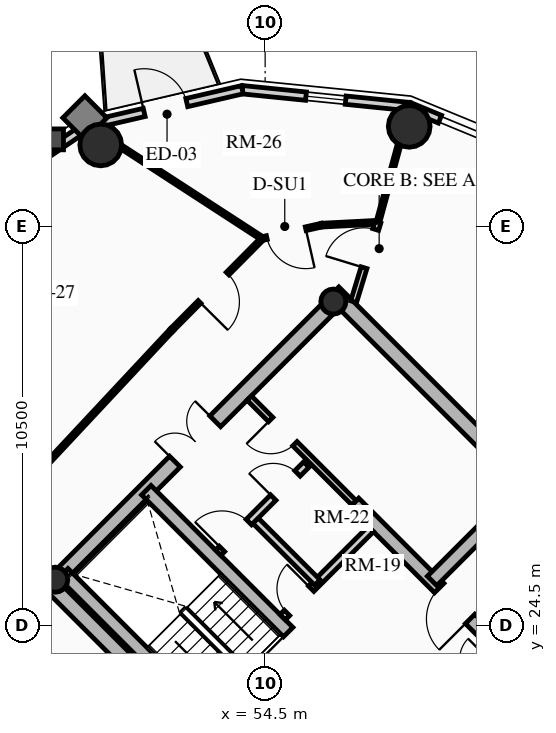
"""IFC4 building model, lengths in metres.
Left out: names, types, materials, properties, quantities, classifications, styles, units other than length and angle.
Written with IfcOpenShell. Run it as: python <this file> out.ifc"""

import sys

from ifc_helpers import new_model, si_unit, direction, frame, frame_2d, origin, origin_2d, place, context, subcontext, project, spatial, rectangle, circle, hollow_circle, extrude, source, transform, mapped, element, fill, save


model = new_model("IFC4")
c1 = context("Model", 3, precision=1e-05, world=origin(), true_north=direction((0.0, 1.0)))
c2 = subcontext(c1, "Body", "Model", "MODEL_VIEW")
j1 = project(units=[si_unit("LENGTHUNIT", "METRE"), si_unit("PLANEANGLEUNIT", "RADIAN")], contexts=[c1])
p1 = place(None, origin())
s1 = spatial("IfcSite", under=j1, at=p1, CompositionType="ELEMENT")
p2 = place(p1, origin())
s2 = spatial("IfcBuilding", under=s1, at=p2, CompositionType="ELEMENT")
p3 = place(p2, frame((0.0, 0.0, 232.45)))
s3 = spatial("IfcBuildingStorey", under=s2, at=p3, CompositionType="ELEMENT", Elevation=232.45)
for number, where, z_axis, x_axis in (
    (1, (58.702, 15.732, 0.0), (0.0, 0.0, 1.0), (-0.707, 0.707, 0.0)),
    (2, (66.268, 23.298, 0.0), (0.0, 0.0, 1.0), (-0.707, 0.707, 0.0)),
):
    element("IfcWall", number, at=place(p3, frame(where, z_axis=z_axis, x_axis=x_axis)), inside=s3, PredefinedType="SHEAR", context=c2, shape_type="SweptSolid", body=[
        extrude(rectangle(XDim=14.1, YDim=0.4, at=frame_2d((7.05, 0.0))), origin(), (0.0, 0.0, 1.0), 3.2),
    ])
p4 = place(p3, frame((48.873, 25.561, 0.0), z_axis=(0.0, 0.0, 1.0), x_axis=(0.707106781187, 0.707106781187, 0.0)))
e3 = element("IfcWall", 3, at=p4, inside=s3, PredefinedType="SHEAR", context=c2, shape_type="SweptSolid", body=[
    extrude(rectangle(XDim=10.7, YDim=0.4, at=frame_2d((5.35, 0.0))), origin(), (0.0, 0.0, 1.0), 3.2),
])
m1 = source(origin(), c2, "Body", "SweptSolid", [
    extrude(rectangle(XDim=1.5, YDim=2.02, at=frame_2d((0.75, 1.01))), frame((0.0, 0.21, 0.0), z_axis=(0.0, -1.0, 0.0), x_axis=(1.0, 0.0, 0.0)), (0.0, 0.0, 1.0), 0.42),
])
p5 = place(p4, frame((4.6, 0.0, 0.0)))
e4 = element("IfcOpeningElement", 4, at=p5, cuts=e3, PredefinedType="OPENING", context=c2, shape_type="MappedRepresentation", body=[
    mapped(m1, transform((0.0, 0.0, 0.0), x_axis=(1.0, 0.0, 0.0), y_axis=(0.0, 1.0, 0.0), z_axis=(0.0, 0.0, 1.0), scale=1.0)),
])
p6 = place(p3, frame((61.06, 18.373, 0.0), z_axis=(0.0, 0.0, 1.0), x_axis=(-0.707106781187, 0.707106781187, 0.0)))
e5 = element("IfcWall", 5, at=p6, inside=s3, PredefinedType="SHEAR", context=c2, shape_type="SweptSolid", body=[
    extrude(rectangle(XDim=13.7, YDim=0.35, at=frame_2d((6.85, 0.0))), origin(), (0.0, 0.0, 1.0), 3.2),
])
m2 = source(origin(), c2, "Body", "SweptSolid", [
    extrude(rectangle(XDim=1.1, YDim=2.015, at=frame_2d((0.55, 1.007))), frame((0.0, 0.185, 0.0), z_axis=(0.0, -1.0, 0.0), x_axis=(1.0, 0.0, 0.0)), (0.0, 0.0, 1.0), 0.37),
])
p7 = place(p6, frame((4.85, 0.0, 0.0)))
e6 = element("IfcOpeningElement", 6, at=p7, cuts=e5, PredefinedType="OPENING", context=c2, shape_type="MappedRepresentation", body=[
    mapped(m2, transform((0.0, 0.0, 0.0), x_axis=(1.0, 0.0, 0.0), y_axis=(0.0, 1.0, 0.0), z_axis=(0.0, 0.0, 1.0), scale=1.0)),
])
p8 = place(p6, frame((0.625, 0.0, 0.0)))
e7 = element("IfcOpeningElement", 7, at=p8, cuts=e5, PredefinedType="OPENING", context=c2, shape_type="MappedRepresentation", body=[
    mapped(m2, transform((0.0, 0.0, 0.0), x_axis=(1.0, 0.0, 0.0), y_axis=(0.0, 1.0, 0.0), z_axis=(0.0, 0.0, 1.0), scale=1.0)),
])
p9 = place(p6, frame((2.625, 0.0, 0.0)))
e8 = element("IfcOpeningElement", 8, at=p9, cuts=e5, PredefinedType="OPENING", context=c2, shape_type="MappedRepresentation", body=[
    mapped(m2, transform((0.0, 0.0, 0.0), x_axis=(1.0, 0.0, 0.0), y_axis=(0.0, 1.0, 0.0), z_axis=(0.0, 0.0, 1.0), scale=1.0)),
])
m3 = source(origin(), c2, "Body", "SweptSolid", [
    extrude(rectangle(XDim=1.15, YDim=2.02, at=frame_2d((0.575, 1.01))), frame((0.0, 0.185, 0.0), z_axis=(0.0, -1.0, 0.0), x_axis=(1.0, 0.0, 0.0)), (0.0, 0.0, 1.0), 0.37),
])
p10 = place(p6, frame((7.27, 0.0, 0.0)))
e9 = element("IfcOpeningElement", 9, at=p10, cuts=e5, PredefinedType="OPENING", context=c2, shape_type="MappedRepresentation", body=[
    mapped(m3, transform((0.0, 0.0, 0.0), x_axis=(1.0, 0.0, 0.0), y_axis=(0.0, 1.0, 0.0), z_axis=(0.0, 0.0, 1.0), scale=1.0)),
])
p11 = place(p3, frame((63.627, 20.94, 0.0), z_axis=(0.0, 0.0, 1.0), x_axis=(-0.707119496762, 0.707094065383, 0.0)))
e10 = element("IfcWall", 10, at=p11, inside=s3, PredefinedType="SHEAR", context=c2, shape_type="SweptSolid", body=[
    extrude(rectangle(XDim=9.6, YDim=0.35, at=frame_2d((4.8, 0.0))), origin(), (0.0, 0.0, 1.0), 3.2),
])
p12 = place(p11, frame((5.28, 0.0, 0.0)))
e11 = element("IfcOpeningElement", 11, at=p12, cuts=e10, PredefinedType="OPENING", context=c2, shape_type="MappedRepresentation", body=[
    mapped(m3, transform((0.0, 0.0, 0.0), x_axis=(1.0, 0.0, 0.0), y_axis=(0.0, 1.0, 0.0), z_axis=(0.0, 0.0, 1.0), scale=1.0)),
])
p13 = place(p3, frame((53.922, 21.141, 0.0), z_axis=(0.0, 0.0, 1.0), x_axis=(-0.707106781187, 0.707106781187, 0.0)))
e12 = element("IfcWall", 12, at=p13, inside=s3, PredefinedType="SHEAR", context=c2, shape_type="SweptSolid", body=[
    extrude(rectangle(XDim=6.695, YDim=0.35, at=frame_2d((3.348, 0.0))), origin(), (0.0, 0.0, 1.0), 3.2),
])
p14 = place(p3, frame((58.893, 25.674, 0.0), z_axis=(0.0, 0.0, 1.0), x_axis=(0.707106781187, 0.707106781187, 0.0)))
e13 = element("IfcWall", 13, at=p14, inside=s3, PredefinedType="SHEAR", context=c2, shape_type="SweptSolid", body=[
    extrude(rectangle(XDim=3.285, YDim=0.35, at=frame_2d((1.643, 0.0))), origin(), (0.0, 0.0, 1.0), 3.2),
])
for number, where, z_axis, x_axis in (
    (14, (48.976, 25.706, 0.0), (0.0, 0.0, 1.0), (0.707, 0.707, 0.0)),
    (15, (56.294, 33.024, 0.0), (0.0, 0.0, 1.0), (0.707, 0.707, 0.0)),
):
    element("IfcColumn", number, at=place(p3, frame(where, z_axis=z_axis, x_axis=x_axis)), inside=s3, PredefinedType="COLUMN", context=c2, shape_type="SweptSolid", body=[
        extrude(hollow_circle(Radius=0.33, WallThickness=0.025, at=origin_2d()), origin(), (0.0, 0.0, 1.0), 3.2),
    ])
for number, where, z_axis, x_axis in (
    (16, (58.291, 37.635, 0.0), (0.0, 0.0, 1.0), (1.0, 0.0, 0.0)),
    (17, (50.173, 37.146, 0.0), (0.0, 0.0, 1.0), (1.0, 0.0, 0.0)),
):
    element("IfcColumn", number, at=place(p3, frame(where, z_axis=z_axis, x_axis=x_axis)), inside=s3, PredefinedType="USERDEFINED", context=c2, shape_type="SweptSolid", body=[
        extrude(circle(Radius=0.55, at=origin_2d()), origin(), (0.0, 0.0, 1.0), 3.2),
    ])
p15 = place(p3, frame((58.295, 38.155, 0.0), z_axis=(0.0, 0.0, 1.0), x_axis=(0.924515260676, -0.381145028536, 0.0)))
e18 = element("IfcWall", 18, at=p15, inside=s3, PredefinedType="SOLIDWALL", context=c2, shape_type="SweptSolid", body=[
    extrude(rectangle(XDim=0.87, YDim=0.22, at=frame_2d((0.435, 0.0))), origin(), (0.0, 0.0, 1.0), 2.402),
])
p16 = place(p3, frame((53.9, 38.599, 0.0), z_axis=(0.0, 0.0, 1.0), x_axis=(0.994929930991, -0.100570534541, 0.0)))
e19 = element("IfcWall", 19, at=p16, inside=s3, PredefinedType="SOLIDWALL", context=c2, shape_type="SweptSolid", body=[
    extrude(rectangle(XDim=4.418, YDim=0.22, at=frame_2d((2.209, 0.0))), origin(), (0.0, 0.0, 1.0), 2.402),
])
m4 = source(origin(), c2, "Body", "SweptSolid", [
    extrude(rectangle(XDim=1.05, YDim=1.3, at=frame_2d((0.525, 0.65))), frame((0.0, 0.12, 0.0), z_axis=(0.0, -1.0, 0.0), x_axis=(1.0, 0.0, 0.0)), (0.0, 0.0, 1.0), 0.24),
])
p17 = place(p16, frame((1.684, 0.0, 0.65)))
e20 = element("IfcOpeningElement", 20, at=p17, cuts=e19, PredefinedType="OPENING", context=c2, shape_type="MappedRepresentation", body=[
    mapped(m4, transform((0.0, 0.0, 0.0), x_axis=(1.0, 0.0, 0.0), y_axis=(0.0, 1.0, 0.0), z_axis=(0.0, 0.0, 1.0), scale=1.0)),
])
p18 = place(p3, frame((49.856, 37.663, 0.0), z_axis=(0.0, 0.0, 1.0), x_axis=(0.974249228678, 0.225473813158, 0.0)))
e21 = element("IfcWall", 21, at=p18, inside=s3, PredefinedType="SOLIDWALL", context=c2, shape_type="SweptSolid", body=[
    extrude(rectangle(XDim=4.15, YDim=0.22, at=frame_2d((2.075, 0.0))), origin(), (0.0, 0.0, 1.0), 2.402),
])
m5 = source(origin(), c2, "Body", "SweptSolid", [
    extrude(rectangle(XDim=1.15, YDim=2.005, at=frame_2d((0.575, 1.002))), frame((0.0, 0.12, 0.0), z_axis=(0.0, -1.0, 0.0), x_axis=(1.0, 0.0, 0.0)), (0.0, 0.0, 1.0), 0.24),
])
p19 = place(p18, frame((1.5, 0.0, 0.0)))
e22 = element("IfcOpeningElement", 22, at=p19, cuts=e21, PredefinedType="OPENING", context=c2, shape_type="MappedRepresentation", body=[
    mapped(m5, transform((0.0, 0.0, 0.0), x_axis=(1.0, 0.0, 0.0), y_axis=(0.0, 1.0, 0.0), z_axis=(0.0, 0.0, 1.0), scale=1.0)),
])
p20 = place(p3, frame((46.561, 35.439, 0.0), z_axis=(0.0, 0.0, 1.0), x_axis=(0.828833723692, 0.559495003079, 0.0)))
e23 = element("IfcWall", 23, at=p20, inside=s3, PredefinedType="SOLIDWALL", context=c2, shape_type="SweptSolid", body=[
    extrude(rectangle(XDim=3.976, YDim=0.22, at=frame_2d((1.988, 0.0))), origin(), (0.0, 0.0, 1.0), 2.402),
])
p21 = place(p3, frame((58.214, 21.467, 0.0), z_axis=(0.0, 0.0, 1.0), x_axis=(0.707106781187, 0.707106781187, 0.0)))
e24 = element("IfcWall", 24, at=p21, inside=s3, PredefinedType="PARTITIONING", context=c2, shape_type="SweptSolid", body=[
    extrude(rectangle(XDim=3.28, YDim=0.2, at=frame_2d((1.64, 0.0))), origin(), (0.0, 0.0, 1.0), 2.765),
])
m6 = source(origin(), c2, "Body", "SweptSolid", [
    extrude(rectangle(XDim=1.5, YDim=2.02, at=frame_2d((0.75, 1.01))), frame((0.0, 0.11, 0.0), z_axis=(0.0, -1.0, 0.0), x_axis=(1.0, 0.0, 0.0)), (0.0, 0.0, 1.0), 0.22),
])
p22 = place(p21, frame((1.55, 0.0, 0.0)))
e25 = element("IfcOpeningElement", 25, at=p22, cuts=e24, PredefinedType="OPENING", context=c2, shape_type="MappedRepresentation", body=[
    mapped(m6, transform((0.0, 0.0, 0.0), x_axis=(1.0, 0.0, 0.0), y_axis=(0.0, 1.0, 0.0), z_axis=(0.0, 0.0, 1.0), scale=1.0)),
])
p23 = place(p3, frame((54.961, 24.719, 0.0), z_axis=(0.0, 0.0, 1.0), x_axis=(0.707106781187, 0.707106781187, 0.0)))
e26 = element("IfcWall", 26, at=p23, inside=s3, PredefinedType="PARTITIONING", context=c2, shape_type="SweptSolid", body=[
    extrude(rectangle(XDim=3.28, YDim=0.2, at=frame_2d((1.64, 0.0))), origin(), (0.0, 0.0, 1.0), 2.765),
])
m7 = source(origin(), c2, "Body", "SweptSolid", [
    extrude(rectangle(XDim=0.9, YDim=2.005, at=frame_2d((0.45, 1.002))), frame((0.0, 0.11, 0.0), z_axis=(0.0, -1.0, 0.0), x_axis=(1.0, 0.0, 0.0)), (0.0, 0.0, 1.0), 0.22),
])
p24 = place(p23, frame((0.16, 0.0, 0.0)))
e27 = element("IfcOpeningElement", 27, at=p24, cuts=e26, PredefinedType="OPENING", context=c2, shape_type="MappedRepresentation", body=[
    mapped(m7, transform((0.0, 0.0, 0.0), x_axis=(1.0, 0.0, 0.0), y_axis=(0.0, 1.0, 0.0), z_axis=(0.0, 0.0, 1.0), scale=1.0)),
])
p25 = place(p3, frame((55.874, 25.631, 0.0), z_axis=(0.0, 0.0, 1.0), x_axis=(-0.707157639372, 0.707055919343, 0.0)))
e28 = element("IfcWall", 28, at=p25, inside=s3, PredefinedType="PARTITIONING", context=c2, shape_type="SweptSolid", body=[
    extrude(rectangle(XDim=2.4, YDim=0.2, at=frame_2d((1.2, 0.0))), origin(), (0.0, 0.0, 1.0), 2.765),
])
p26 = place(p3, frame((53.264, 26.416, 0.0), z_axis=(0.0, 0.0, 1.0), x_axis=(0.707106781187, 0.707106781187, 0.0)))
e29 = element("IfcWall", 29, at=p26, inside=s3, PredefinedType="PARTITIONING", context=c2, shape_type="SweptSolid", body=[
    extrude(rectangle(XDim=3.28, YDim=0.2, at=frame_2d((1.64, 0.0))), origin(), (0.0, 0.0, 1.0), 2.765),
])
m8 = source(origin(), c2, "Body", "SweptSolid", [
    extrude(rectangle(XDim=1.0, YDim=2.015, at=frame_2d((0.5, 1.007))), frame((0.0, 0.11, 0.0), z_axis=(0.0, -1.0, 0.0), x_axis=(1.0, 0.0, 0.0)), (0.0, 0.0, 1.0), 0.22),
])
p27 = place(p26, frame((0.14, 0.0, 0.0)))
e30 = element("IfcOpeningElement", 30, at=p27, cuts=e29, PredefinedType="OPENING", context=c2, shape_type="MappedRepresentation", body=[
    mapped(m8, transform((0.0, 0.0, 0.0), x_axis=(1.0, 0.0, 0.0), y_axis=(0.0, 1.0, 0.0), z_axis=(0.0, 0.0, 1.0), scale=1.0)),
])
p28 = place(p26, frame((2.05, 0.0, 0.0)))
e31 = element("IfcOpeningElement", 31, at=p28, cuts=e29, PredefinedType="OPENING", context=c2, shape_type="MappedRepresentation", body=[
    mapped(m7, transform((0.0, 0.0, 0.0), x_axis=(1.0, 0.0, 0.0), y_axis=(0.0, 1.0, 0.0), z_axis=(0.0, 0.0, 1.0), scale=1.0)),
])
p29 = place(p3, frame((56.839, 27.728, 0.0), z_axis=(0.0, 0.0, 1.0), x_axis=(-0.707106781187, 0.707106781187, 0.0)))
e32 = element("IfcWall", 32, at=p29, inside=s3, PredefinedType="PARTITIONING", context=c2, shape_type="SweptSolid", body=[
    extrude(rectangle(XDim=3.9, YDim=0.16, at=frame_2d((1.95, 0.0))), origin(), (0.0, 0.0, 1.0), 2.765),
])
m9 = source(origin(), c2, "Body", "SweptSolid", [
    extrude(rectangle(XDim=0.9, YDim=2.005, at=frame_2d((0.45, 1.002))), frame((0.0, 0.09, 0.0), z_axis=(0.0, -1.0, 0.0), x_axis=(1.0, 0.0, 0.0)), (0.0, 0.0, 1.0), 0.18),
])
p30 = place(p29, frame((2.2, 0.0, 0.0)))
e33 = element("IfcOpeningElement", 33, at=p30, cuts=e32, PredefinedType="OPENING", context=c2, shape_type="MappedRepresentation", body=[
    mapped(m9, transform((0.0, 0.0, 0.0), x_axis=(1.0, 0.0, 0.0), y_axis=(0.0, 1.0, 0.0), z_axis=(0.0, 0.0, 1.0), scale=1.0)),
])
p31 = place(p3, frame((57.467, 35.111, 0.0), z_axis=(0.0, 0.0, 1.0), x_axis=(-0.998691757323, -0.051134859488, 0.0)))
e34 = element("IfcWall", 34, at=p31, inside=s3, PredefinedType="MOVABLE", context=c2, shape_type="SweptSolid", body=[
    extrude(rectangle(XDim=1.485, YDim=0.1, at=frame_2d((0.742, 0.0))), origin(), (0.0, 0.0, 1.0), 2.402),
])
p32 = place(p3, frame((55.984, 35.035, 0.0), z_axis=(0.0, 0.0, 1.0), x_axis=(-0.975290305708, -0.22092718165, 0.0)))
e35 = element("IfcWall", 35, at=p32, inside=s3, PredefinedType="MOVABLE", context=c2, shape_type="SweptSolid", body=[
    extrude(rectangle(XDim=1.597, YDim=0.1, at=frame_2d((0.798, 0.0))), origin(), (0.0, 0.0, 1.0), 2.335),
])
m10 = source(origin(), c2, "Body", "SweptSolid", [
    extrude(rectangle(XDim=1.05, YDim=2.015, at=frame_2d((0.525, 1.007))), frame((0.0, 0.06, 0.0), z_axis=(0.0, -1.0, 0.0), x_axis=(1.0, 0.0, 0.0)), (0.0, 0.0, 1.0), 0.12),
])
p33 = place(p32, frame((0.427, 0.0, 0.0)))
e36 = element("IfcOpeningElement", 36, at=p33, cuts=e35, PredefinedType="OPENING", context=c2, shape_type="MappedRepresentation", body=[
    mapped(m10, transform((0.0, 0.0, 0.0), x_axis=(1.0, 0.0, 0.0), y_axis=(0.0, 1.0, 0.0), z_axis=(0.0, 0.0, 1.0), scale=1.0)),
])
p34 = place(p3, frame((54.427, 34.683, 0.0), z_axis=(0.0, 0.0, 1.0), x_axis=(-0.704178989986, -0.710022499687, 0.0)))
e37 = element("IfcWall", 37, at=p34, inside=s3, PredefinedType="MOVABLE", context=c2, shape_type="SweptSolid", body=[
    extrude(rectangle(XDim=3.384, YDim=0.1, at=frame_2d((1.692, 0.0))), origin(), (0.0, 0.0, 1.0), 2.402),
])
p35 = place(p34, frame((1.298, 0.0, 0.0)))
e38 = element("IfcOpeningElement", 38, at=p35, cuts=e37, PredefinedType="OPENING", context=c2, shape_type="MappedRepresentation", body=[
    mapped(m10, transform((0.0, 0.0, 0.0), x_axis=(1.0, 0.0, 0.0), y_axis=(0.0, 1.0, 0.0), z_axis=(0.0, 0.0, 1.0), scale=1.0)),
])
p36 = place(p3, frame((52.043, 32.28, 0.0), z_axis=(0.0, 0.0, 1.0), x_axis=(-0.682606081633, -0.730786519661, 0.0)))
e39 = element("IfcWall", 39, at=p36, inside=s3, PredefinedType="MOVABLE", context=c2, shape_type="SweptSolid", body=[
    extrude(rectangle(XDim=6.527, YDim=0.1, at=frame_2d((3.263, 0.0))), origin(), (0.0, 0.0, 1.0), 2.335),
])
p37 = place(p3, frame((57.467, 35.111, 0.0), z_axis=(0.0, 0.0, 1.0), x_axis=(0.263354670488, 0.964699081337, 0.0)))
e40 = element("IfcWall", 40, at=p37, inside=s3, PredefinedType="MOVABLE", context=c2, shape_type="SweptSolid", body=[
    extrude(rectangle(XDim=3.134, YDim=0.1, at=frame_2d((1.567, 0.0))), origin(), (0.0, 0.0, 1.0), 2.402),
])
p38 = place(p3, frame((54.427, 34.683, 0.0), z_axis=(0.0, 0.0, 1.0), x_axis=(-0.83860663594, 0.544737469023, 0.0)))
e41 = element("IfcWall", 41, at=p38, inside=s3, PredefinedType="MOVABLE", context=c2, shape_type="SweptSolid", body=[
    extrude(rectangle(XDim=5.439, YDim=0.1, at=frame_2d((2.72, 0.0))), origin(), (0.0, 0.0, 1.0), 2.402),
])
p39 = place(p3, frame((56.828, 33.021, 0.0), z_axis=(0.0, 0.0, 1.0), x_axis=(0.292139093972, 0.956375841274, 0.0)))
e42 = element("IfcWall", 42, at=p39, inside=s3, PredefinedType="PARTITIONING", context=c2, shape_type="SweptSolid", body=[
    extrude(rectangle(XDim=2.186, YDim=0.16, at=frame_2d((1.093, 0.0))), origin(), (0.0, 0.0, 1.0), 2.335),
])
m11 = source(origin(), c2, "Body", "SweptSolid", [
    extrude(rectangle(XDim=1.05, YDim=2.015, at=frame_2d((0.525, 1.007))), frame((0.0, 0.09, 0.0), z_axis=(0.0, -1.0, 0.0), x_axis=(1.0, 0.0, 0.0)), (0.0, 0.0, 1.0), 0.18),
])
p40 = place(p39, frame((0.936, 0.0, 0.0)))
e43 = element("IfcOpeningElement", 43, at=p40, cuts=e42, PredefinedType="OPENING", context=c2, shape_type="MappedRepresentation", body=[
    mapped(m11, transform((0.0, 0.0, 0.0), x_axis=(1.0, 0.0, 0.0), y_axis=(0.0, 1.0, 0.0), z_axis=(0.0, 0.0, 1.0), scale=1.0)),
])
m12 = source(origin(), c2, "Body", "SweptSolid", [
    extrude(rectangle(XDim=1.05, YDim=1.3, at=frame_2d((0.525, 0.65))), frame((0.0, 0.03, 0.0), z_axis=(0.0, -1.0, 0.0), x_axis=(1.0, 0.0, 0.0)), (0.0, 0.0, 1.0), 0.06),
])
p41 = place(p17, origin())
e44 = element("IfcWindow", 44, at=p41, inside=s3, PartitioningType="SINGLE_PANEL", PredefinedType="WINDOW", context=c2, shape_type="MappedRepresentation", body=[
    mapped(m12, transform((0.0, 0.0, 0.0), x_axis=(1.0, 0.0, 0.0), y_axis=(0.0, 1.0, 0.0), z_axis=(0.0, 0.0, 1.0), scale=1.0)),
])
fill(e20, e44)
m13 = source(origin(), c2, "Body", "SweptSolid", [
    extrude(rectangle(XDim=1.15, YDim=2.005, at=frame_2d((0.575, 1.002))), frame((0.0, 0.025, 0.0), z_axis=(0.0, -1.0, 0.0), x_axis=(1.0, 0.0, 0.0)), (0.0, 0.0, 1.0), 0.05),
])
p42 = place(p19, origin())
e45 = element("IfcDoor", 45, at=p42, inside=s3, OperationType="SINGLE_SWING_LEFT", PredefinedType="DOOR", context=c2, shape_type="MappedRepresentation", body=[
    mapped(m13, transform((0.0, 0.0, 0.0), x_axis=(1.0, 0.0, 0.0), y_axis=(0.0, 1.0, 0.0), z_axis=(0.0, 0.0, 1.0), scale=1.0)),
])
fill(e22, e45)
m14 = source(origin(), c2, "Body", "SweptSolid", [
    extrude(rectangle(XDim=1.15, YDim=2.02, at=frame_2d((0.575, 1.01))), frame((0.0, 0.025, 0.0), z_axis=(0.0, -1.0, 0.0), x_axis=(1.0, 0.0, 0.0)), (0.0, 0.0, 1.0), 0.05),
])
p43 = place(p10, origin())
e46 = element("IfcDoor", 46, at=p43, inside=s3, OperationType="SINGLE_SWING_RIGHT", PredefinedType="DOOR", context=c2, shape_type="MappedRepresentation", body=[
    mapped(m14, transform((0.0, 0.0, 0.0), x_axis=(1.0, 0.0, 0.0), y_axis=(0.0, 1.0, 0.0), z_axis=(0.0, 0.0, 1.0), scale=1.0)),
])
fill(e9, e46)
p44 = place(p12, origin())
e47 = element("IfcDoor", 47, at=p44, inside=s3, OperationType="SINGLE_SWING_LEFT", PredefinedType="DOOR", context=c2, shape_type="MappedRepresentation", body=[
    mapped(m14, transform((0.0, 0.0, 0.0), x_axis=(1.0, 0.0, 0.0), y_axis=(0.0, 1.0, 0.0), z_axis=(0.0, 0.0, 1.0), scale=1.0)),
])
fill(e11, e47)
m15 = source(origin(), c2, "Body", "SweptSolid", [
    extrude(rectangle(XDim=1.5, YDim=2.02, at=frame_2d((0.75, 1.01))), frame((0.0, 0.025, 0.0), z_axis=(0.0, -1.0, 0.0), x_axis=(1.0, 0.0, 0.0)), (0.0, 0.0, 1.0), 0.05),
])
p45 = place(p5, origin())
e48 = element("IfcDoor", 48, at=p45, inside=s3, OperationType="DOUBLE_DOOR_SINGLE_SWING", PredefinedType="DOOR", context=c2, shape_type="MappedRepresentation", body=[
    mapped(m15, transform((0.0, 0.0, 0.0), x_axis=(1.0, 0.0, 0.0), y_axis=(0.0, 1.0, 0.0), z_axis=(0.0, 0.0, 1.0), scale=1.0)),
])
fill(e4, e48)
m16 = source(origin(), c2, "Body", "SweptSolid", [
    extrude(rectangle(XDim=0.9, YDim=2.005, at=frame_2d((0.45, 1.002))), frame((0.0, 0.025, 0.0), z_axis=(0.0, -1.0, 0.0), x_axis=(1.0, 0.0, 0.0)), (0.0, 0.0, 1.0), 0.05),
])
p46 = place(p24, origin())
e49 = element("IfcDoor", 49, at=p46, inside=s3, OperationType="SINGLE_SWING_RIGHT", PredefinedType="DOOR", context=c2, shape_type="MappedRepresentation", body=[
    mapped(m16, transform((0.0, 0.0, 0.0), x_axis=(1.0, 0.0, 0.0), y_axis=(0.0, 1.0, 0.0), z_axis=(0.0, 0.0, 1.0), scale=1.0)),
])
fill(e27, e49)
m17 = source(origin(), c2, "Body", "SweptSolid", [
    extrude(rectangle(XDim=1.0, YDim=2.015, at=frame_2d((0.5, 1.007))), frame((0.0, 0.025, 0.0), z_axis=(0.0, -1.0, 0.0), x_axis=(1.0, 0.0, 0.0)), (0.0, 0.0, 1.0), 0.05),
])
p47 = place(p27, origin())
e50 = element("IfcDoor", 50, at=p47, inside=s3, OperationType="SINGLE_SWING_LEFT", PredefinedType="DOOR", context=c2, shape_type="MappedRepresentation", body=[
    mapped(m17, transform((0.0, 0.0, 0.0), x_axis=(1.0, 0.0, 0.0), y_axis=(0.0, 1.0, 0.0), z_axis=(0.0, 0.0, 1.0), scale=1.0)),
])
fill(e30, e50)
p48 = place(p28, origin())
e51 = element("IfcDoor", 51, at=p48, inside=s3, OperationType="SINGLE_SWING_LEFT", PredefinedType="DOOR", context=c2, shape_type="MappedRepresentation", body=[
    mapped(m16, transform((0.0, 0.0, 0.0), x_axis=(1.0, 0.0, 0.0), y_axis=(0.0, 1.0, 0.0), z_axis=(0.0, 0.0, 1.0), scale=1.0)),
])
fill(e31, e51)
p49 = place(p30, origin())
e52 = element("IfcDoor", 52, at=p49, inside=s3, OperationType="SINGLE_SWING_RIGHT", PredefinedType="DOOR", context=c2, shape_type="MappedRepresentation", body=[
    mapped(m16, transform((0.0, 0.0, 0.0), x_axis=(1.0, 0.0, 0.0), y_axis=(0.0, 1.0, 0.0), z_axis=(0.0, 0.0, 1.0), scale=1.0)),
])
fill(e33, e52)
m18 = source(origin(), c2, "Body", "SweptSolid", [
    extrude(rectangle(XDim=1.05, YDim=2.015, at=frame_2d((0.525, 1.007))), frame((0.0, 0.025, 0.0), z_axis=(0.0, -1.0, 0.0), x_axis=(1.0, 0.0, 0.0)), (0.0, 0.0, 1.0), 0.05),
])
p50 = place(p40, origin())
e53 = element("IfcDoor", 53, at=p50, inside=s3, OperationType="SINGLE_SWING_LEFT", PredefinedType="DOOR", context=c2, shape_type="MappedRepresentation", body=[
    mapped(m18, transform((0.0, 0.0, 0.0), x_axis=(1.0, 0.0, 0.0), y_axis=(0.0, 1.0, 0.0), z_axis=(0.0, 0.0, 1.0), scale=1.0)),
])
fill(e43, e53)
p51 = place(p33, origin())
e54 = element("IfcDoor", 54, at=p51, inside=s3, OperationType="SINGLE_SWING_LEFT", PredefinedType="DOOR", context=c2, shape_type="MappedRepresentation", body=[
    mapped(m18, transform((0.0, 0.0, 0.0), x_axis=(1.0, 0.0, 0.0), y_axis=(0.0, 1.0, 0.0), z_axis=(0.0, 0.0, 1.0), scale=1.0)),
])
fill(e36, e54)
p52 = place(p35, origin())
e55 = element("IfcDoor", 55, at=p52, inside=s3, OperationType="SINGLE_SWING_RIGHT", PredefinedType="DOOR", context=c2, shape_type="MappedRepresentation", body=[
    mapped(m18, transform((0.0, 0.0, 0.0), x_axis=(1.0, 0.0, 0.0), y_axis=(0.0, 1.0, 0.0), z_axis=(0.0, 0.0, 1.0), scale=1.0)),
])
fill(e38, e55)
save(model, sys.argv[1])
